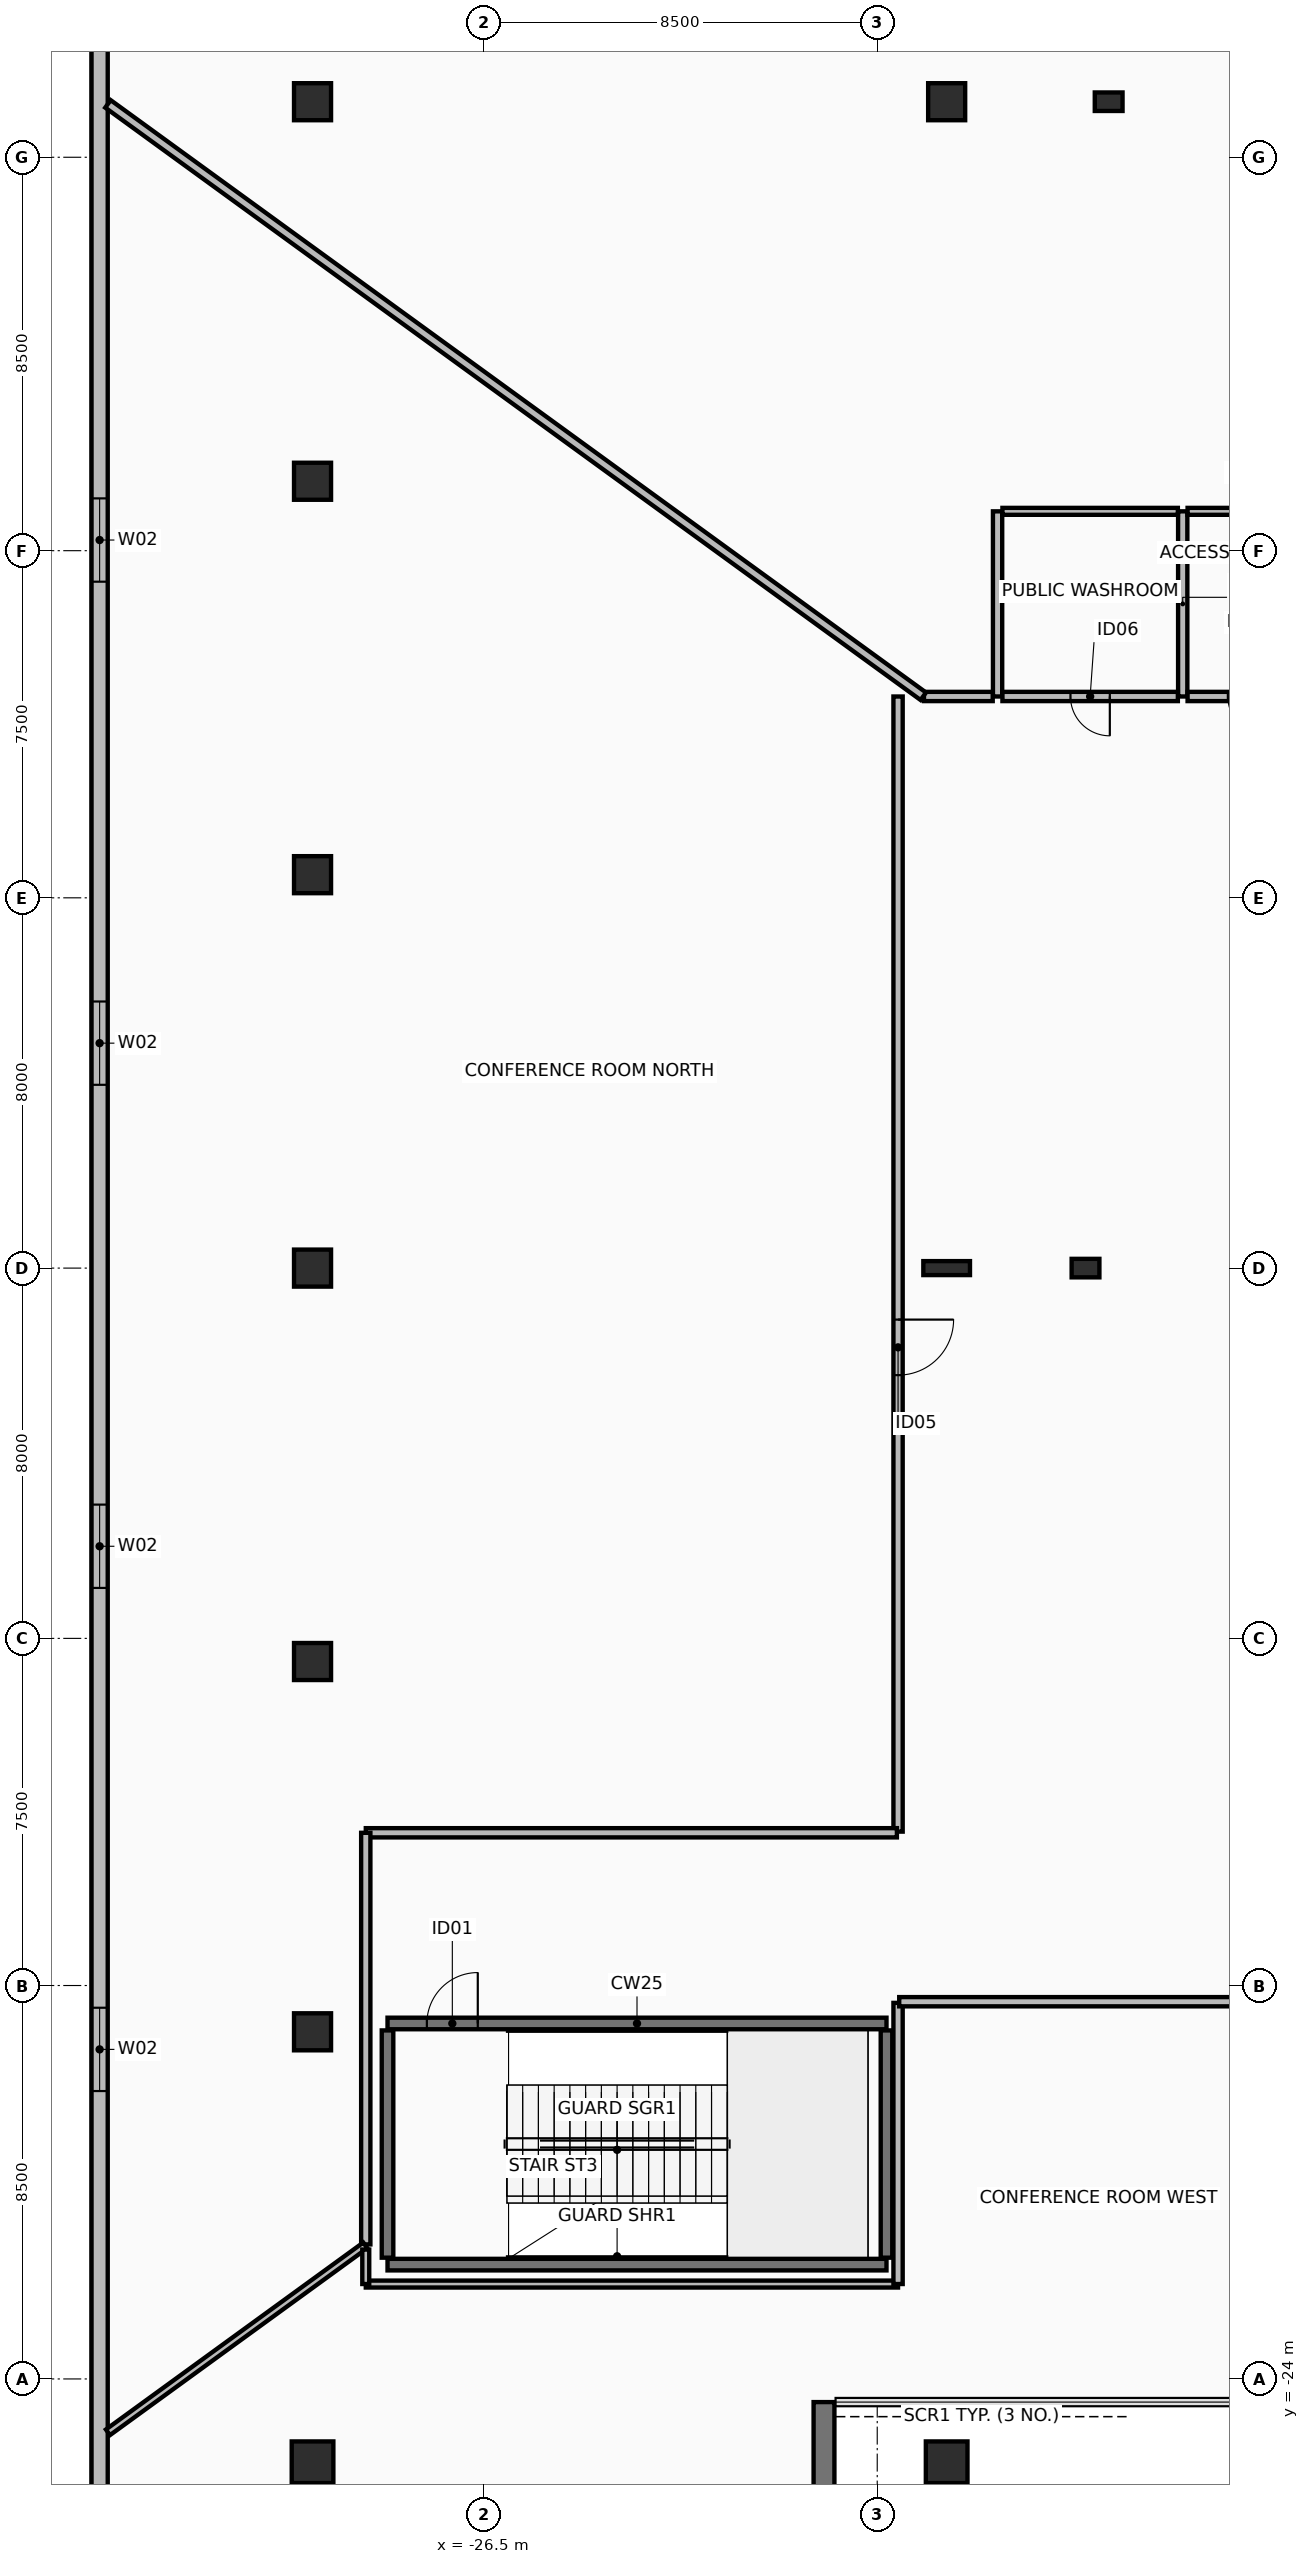
"""IFC4 building model, lengths in metres.
Left out: names, types, materials, properties, quantities, classifications, styles, units other than length and angle.
Written with IfcOpenShell. Run it as: python <this file> out.ifc"""

import sys

from ifc_helpers import new_model, si_unit, direction, frame, frame_2d, origin, origin_2d, place, context, subcontext, project, spatial, rectangle, hollow_rectangle, i_section, extrude, element, fill, save


model = new_model("IFC4")
c1 = context("Model", 3, precision=1e-05, world=origin(), true_north=direction((0.0, 1.0)))
c2 = subcontext(c1, "Body", "Model", "MODEL_VIEW")
j1 = project(units=[si_unit("LENGTHUNIT", "METRE"), si_unit("PLANEANGLEUNIT", "RADIAN")], contexts=[c1])
p1 = place(None, origin())
s1 = spatial("IfcSite", under=j1, at=p1, CompositionType="ELEMENT")
p2 = place(p1, origin())
s2 = spatial("IfcBuilding", under=s1, at=p2, CompositionType="ELEMENT")
p3 = place(p2, frame((0.0, 0.0, 11.0)))
s3 = spatial("IfcBuildingStorey", under=s2, at=p3, CompositionType="ELEMENT", Elevation=11.0)
for number, where, z_axis, x_axis in (
    (1, (-13.5, 0.0, 0.0), (0.0, 0.0, 1.0), (1.0, 0.0, 0.0)),
    (2, (-13.0, 25.2, 0.0), (0.0, 0.0, 1.0), (1.0, 0.0, 0.0)),
):
    element("IfcColumn", number, at=place(p3, frame(where, z_axis=z_axis, x_axis=x_axis)), inside=s3, PredefinedType="PILASTER", context=c2, shape_type="SweptSolid", body=[
        extrude(rectangle(XDim=0.6, YDim=0.4, at=origin_2d()), origin(), (0.0, 0.0, 1.0), 5.5),
    ])
p4 = place(p3, frame((-30.2, -25.8, 0.0), z_axis=(0.0, 0.0, 1.0), x_axis=(1.0, 0.0, 0.0)))
e3 = element("IfcColumn", 3, at=p4, inside=s3, PredefinedType="COLUMN", context=c2, shape_type="SweptSolid", body=[
    extrude(hollow_rectangle(XDim=0.9, YDim=0.9, WallThickness=0.05, at=origin_2d()), origin(), (0.0, 0.0, 1.0), 5.5),
])
p5 = place(p3, frame((-30.2, 25.2, 0.0), z_axis=(0.0, 0.0, 1.0), x_axis=(1.0, 0.0, 0.0)))
e4 = element("IfcColumn", 4, at=p5, inside=s3, PredefinedType="COLUMN", context=c2, shape_type="SweptSolid", body=[
    extrude(hollow_rectangle(XDim=0.8, YDim=0.8, WallThickness=0.045, at=origin_2d()), origin(), (0.0, 0.0, 1.0), 5.5),
])
p6 = place(p3, frame((-16.5, -25.8, 0.0), z_axis=(0.0, 0.0, 1.0), x_axis=(1.0, 0.0, 0.0)))
e5 = element("IfcColumn", 5, at=p6, inside=s3, PredefinedType="COLUMN", context=c2, shape_type="SweptSolid", body=[
    extrude(hollow_rectangle(XDim=0.9, YDim=0.9, WallThickness=0.05, at=origin_2d()), origin(), (0.0, 0.0, 1.0), 5.5),
])
for number, where, z_axis, x_axis in (
    (6, (-16.5, 25.2, 0.0), (0.0, 0.0, 1.0), (1.0, 0.0, 0.0)),
    (7, (-30.2, -16.5, 0.0), (0.0, 0.0, 1.0), (1.0, 0.0, 0.0)),
    (8, (-30.2, -8.5, 0.0), (0.0, 0.0, 1.0), (1.0, 0.0, 0.0)),
    (9, (-30.2, 0.0, 0.0), (0.0, 0.0, 1.0), (1.0, 0.0, 0.0)),
    (10, (-30.2, 8.5, 0.0), (0.0, 0.0, 1.0), (1.0, 0.0, 0.0)),
    (11, (-30.2, 17.0, 0.0), (0.0, 0.0, 1.0), (1.0, 0.0, 0.0)),
):
    element("IfcColumn", number, at=place(p3, frame(where, z_axis=z_axis, x_axis=x_axis)), inside=s3, PredefinedType="COLUMN", context=c2, shape_type="SweptSolid", body=[
        extrude(hollow_rectangle(XDim=0.8, YDim=0.8, WallThickness=0.045, at=origin_2d()), origin(), (0.0, 0.0, 1.0), 5.5),
    ])
p7 = place(p3, frame((-16.5, 0.0, 0.0), z_axis=(0.0, 0.0, 1.0), x_axis=(1.0, 0.0, 0.0)))
e12 = element("IfcColumn", 12, at=p7, inside=s3, PredefinedType="COLUMN", context=c2, shape_type="SweptSolid", body=[
    extrude(i_section(OverallWidth=0.302, OverallDepth=1.008, WebThickness=0.021, FlangeThickness=0.04, at=origin_2d()), origin(), (0.0, 0.0, 1.0), 5.5),
])
p8 = place(p3, frame((-19.15, -27.75, 0.0), z_axis=(0.0, 0.0, 1.0), x_axis=(0.0, 1.0, 0.0)))
e13 = element("IfcWall", 13, at=p8, inside=s3, PredefinedType="STANDARD", context=c2, shape_type="SweptSolid", body=[
    extrude(rectangle(XDim=3.25, YDim=0.45, at=frame_2d((1.625, 0.0))), origin(), (0.0, 0.0, 1.0), 5.24),
])
p9 = place(p3, frame((-34.8, 26.6, 0.0), z_axis=(0.0, 0.0, 1.0), x_axis=(0.0, -1.0, 0.0)))
e14 = element("IfcWall", 14, at=p9, inside=s3, PredefinedType="STANDARD", context=c2, shape_type="SweptSolid", body=[
    extrude(rectangle(XDim=54.35, YDim=0.35, at=frame_2d((27.175, 0.0))), origin(), (0.0, 0.0, 1.0), 5.24),
])
p10 = place(p9, frame((9.97, 0.0, 0.95)))
e15 = element("IfcOpeningElement", 15, at=p10, cuts=e14, PredefinedType="OPENING", context=c2, shape_type="SweptSolid", body=[
    extrude(rectangle(XDim=1.8, YDim=2.2, at=frame_2d((0.9, 1.1))), frame((0.0, 0.185, 0.0), z_axis=(0.0, -1.0, 0.0), x_axis=(1.0, 0.0, 0.0)), (0.0, 0.0, 1.0), 0.37),
])
p11 = place(p9, frame((20.84, 0.0, 0.95)))
e16 = element("IfcOpeningElement", 16, at=p11, cuts=e14, PredefinedType="OPENING", context=c2, shape_type="SweptSolid", body=[
    extrude(rectangle(XDim=1.8, YDim=2.2, at=frame_2d((0.9, 1.1))), frame((0.0, 0.185, 0.0), z_axis=(0.0, -1.0, 0.0), x_axis=(1.0, 0.0, 0.0)), (0.0, 0.0, 1.0), 0.37),
])
p12 = place(p9, frame((31.71, 0.0, 0.95)))
e17 = element("IfcOpeningElement", 17, at=p12, cuts=e14, PredefinedType="OPENING", context=c2, shape_type="SweptSolid", body=[
    extrude(rectangle(XDim=1.8, YDim=2.2, at=frame_2d((0.9, 1.1))), frame((0.0, 0.185, 0.0), z_axis=(0.0, -1.0, 0.0), x_axis=(1.0, 0.0, 0.0)), (0.0, 0.0, 1.0), 0.37),
])
p13 = place(p9, frame((42.58, 0.0, 0.95)))
e18 = element("IfcOpeningElement", 18, at=p13, cuts=e14, PredefinedType="OPENING", context=c2, shape_type="SweptSolid", body=[
    extrude(rectangle(XDim=1.8, YDim=2.2, at=frame_2d((0.9, 1.1))), frame((0.0, 0.185, 0.0), z_axis=(0.0, -1.0, 0.0), x_axis=(1.0, 0.0, 0.0)), (0.0, 0.0, 1.0), 0.37),
])
p14 = place(p3, frame((-28.58, -16.32, 0.0), z_axis=(0.0, 0.0, 1.0), x_axis=(1.0, 0.0, 0.0)))
e19 = element("IfcWall", 19, at=p14, inside=s3, PredefinedType="SHEAR", context=c2, shape_type="SweptSolid", body=[
    extrude(rectangle(XDim=10.78, YDim=0.25, at=frame_2d((5.39, 0.0))), origin(), (0.0, 0.0, 1.0), 5.24),
])
p15 = place(p14, frame((0.85, 0.0, 0.0)))
e20 = element("IfcOpeningElement", 20, at=p15, cuts=e19, PredefinedType="OPENING", context=c2, shape_type="SweptSolid", body=[
    extrude(rectangle(XDim=1.1, YDim=2.15, at=frame_2d((0.55, 1.075))), frame((0.0, 0.135, 0.0), z_axis=(0.0, -1.0, 0.0), x_axis=(1.0, 0.0, 0.0)), (0.0, 0.0, 1.0), 0.27),
])
p16 = place(p3, frame((-28.58, -21.53, 0.0), z_axis=(0.0, 0.0, 1.0), x_axis=(1.0, 0.0, 0.0)))
e21 = element("IfcWall", 21, at=p16, inside=s3, PredefinedType="SHEAR", context=c2, shape_type="SweptSolid", body=[
    extrude(rectangle(XDim=10.78, YDim=0.25, at=frame_2d((5.39, 0.0))), origin(), (0.0, 0.0, 1.0), 5.24),
])
for number, where, z_axis, x_axis in (
    (22, (-28.58, -21.38, 0.0), (0.0, 0.0, 1.0), (0.0, 1.0, 0.0)),
    (23, (-17.8, -21.38, 0.0), (0.0, 0.0, 1.0), (0.0, 1.0, 0.0)),
):
    element("IfcWall", number, at=place(p3, frame(where, z_axis=z_axis, x_axis=x_axis)), inside=s3, PredefinedType="SHEAR", context=c2, shape_type="SweptSolid", body=[
        extrude(rectangle(XDim=4.91, YDim=0.25, at=frame_2d((2.455, 0.0))), origin(), (0.0, 0.0, 1.0), 5.24),
    ])
p17 = place(p3, frame((-11.4, 12.35, 0.0), z_axis=(0.0, 0.0, 1.0), x_axis=(0.0, 1.0, 0.0)))
e24 = element("IfcWall", 24, at=p17, inside=s3, PredefinedType="PARTITIONING", context=c2, shape_type="SweptSolid", body=[
    extrude(rectangle(XDim=4.0, YDim=0.2, at=frame_2d((2.0, 0.0))), origin(), (0.0, 0.0, 1.0), 4.785),
])
p18 = place(p3, frame((-11.295, 16.35, 0.0), z_axis=(0.0, 0.0, 1.0), x_axis=(1.0, 0.0, 0.0)))
e25 = element("IfcWall", 25, at=p18, inside=s3, PredefinedType="PARTITIONING", context=c2, shape_type="SweptSolid", body=[
    extrude(rectangle(XDim=2.695, YDim=0.15, at=frame_2d((1.347, 0.0))), origin(), (0.0, 0.0, 1.0), 3.435),
])
p19 = place(p3, frame((-8.705, 12.35, 0.0), z_axis=(0.0, 0.0, 1.0), x_axis=(-1.0, 0.0, 0.0)))
e26 = element("IfcWall", 26, at=p19, inside=s3, PredefinedType="PARTITIONING", context=c2, shape_type="SweptSolid", body=[
    extrude(rectangle(XDim=2.59, YDim=0.2, at=frame_2d((1.295, 0.0))), origin(), (0.0, 0.0, 1.0), 3.435),
])
p20 = place(p19, frame((0.87, 0.0, 0.0)))
e27 = element("IfcOpeningElement", 27, at=p20, cuts=e26, PredefinedType="OPENING", context=c2, shape_type="SweptSolid", body=[
    extrude(rectangle(XDim=0.85, YDim=2.1, at=frame_2d((0.425, 1.05))), frame((0.0, 0.11, 0.0), z_axis=(0.0, -1.0, 0.0), x_axis=(1.0, 0.0, 0.0)), (0.0, 0.0, 1.0), 0.22),
])
p21 = place(p3, frame((-15.4, 12.35, 0.0), z_axis=(0.0, 0.0, 1.0), x_axis=(0.0, 1.0, 0.0)))
e28 = element("IfcWall", 28, at=p21, inside=s3, PredefinedType="PARTITIONING", context=c2, shape_type="SweptSolid", body=[
    extrude(rectangle(XDim=4.0, YDim=0.2, at=frame_2d((2.0, 0.0))), origin(), (0.0, 0.0, 1.0), 4.785),
])
p22 = place(p3, frame((-15.295, 16.35, 0.0), z_axis=(0.0, 0.0, 1.0), x_axis=(1.0, 0.0, 0.0)))
e29 = element("IfcWall", 29, at=p22, inside=s3, PredefinedType="PARTITIONING", context=c2, shape_type="SweptSolid", body=[
    extrude(rectangle(XDim=3.79, YDim=0.15, at=frame_2d((1.895, 0.0))), origin(), (0.0, 0.0, 1.0), 5.24),
])
p23 = place(p3, frame((-11.505, 12.35, 0.0), z_axis=(0.0, 0.0, 1.0), x_axis=(-1.0, 0.0, 0.0)))
e30 = element("IfcWall", 30, at=p23, inside=s3, PredefinedType="PARTITIONING", context=c2, shape_type="SweptSolid", body=[
    extrude(rectangle(XDim=3.79, YDim=0.2, at=frame_2d((1.895, 0.0))), origin(), (0.0, 0.0, 1.0), 5.24),
])
p24 = place(p23, frame((1.47, 0.0, 0.0)))
e31 = element("IfcOpeningElement", 31, at=p24, cuts=e30, PredefinedType="OPENING", context=c2, shape_type="SweptSolid", body=[
    extrude(rectangle(XDim=0.85, YDim=2.1, at=frame_2d((0.425, 1.05))), frame((0.0, 0.11, 0.0), z_axis=(0.0, -1.0, 0.0), x_axis=(1.0, 0.0, 0.0)), (0.0, 0.0, 1.0), 0.22),
])
p25 = place(p3, frame((-15.505, 12.35, 0.0), z_axis=(0.0, 0.0, 1.0), x_axis=(-1.0, 0.0, 0.0)))
e32 = element("IfcWall", 32, at=p25, inside=s3, PredefinedType="PARTITIONING", context=c2, shape_type="SweptSolid", body=[
    extrude(rectangle(XDim=1.485, YDim=0.2, at=frame_2d((0.743, 0.0))), origin(), (0.0, 0.0, 1.0), 3.435),
])
p26 = place(p3, frame((-17.005, 12.355, 0.0), z_axis=(0.0, 0.0, 1.0), x_axis=(-0.809019641583, 0.587781608707, 0.0)))
e33 = element("IfcWall", 33, at=p26, inside=s3, PredefinedType="PARTITIONING", context=c2, shape_type="SweptSolid", body=[
    extrude(rectangle(XDim=21.773, YDim=0.2, at=frame_2d((10.887, 0.0))), origin(), (0.0, 0.0, 1.0), 4.435),
])
p27 = place(p3, frame((-17.55, 12.349, 0.0), z_axis=(0.0, 0.0, 1.0), x_axis=(0.0, -1.0, 0.0)))
e34 = element("IfcWall", 34, at=p27, inside=s3, PredefinedType="PARTITIONING", context=c2, shape_type="SweptSolid", body=[
    extrude(rectangle(XDim=24.524, YDim=0.2, at=frame_2d((12.262, 0.0))), origin(), (0.0, 0.0, 1.0), 3.435),
])
p28 = place(p27, frame((13.462, 0.0, 0.0)))
e35 = element("IfcOpeningElement", 35, at=p28, cuts=e34, PredefinedType="OPENING", context=c2, shape_type="SweptSolid", body=[
    extrude(rectangle(XDim=1.2, YDim=2.15, at=frame_2d((0.6, 1.075))), frame((0.0, 0.11, 0.0), z_axis=(0.0, -1.0, 0.0), x_axis=(1.0, 0.0, 0.0)), (0.0, 0.0, 1.0), 0.22),
])
p29 = place(p3, frame((-17.575, -12.2, 0.0), z_axis=(0.0, 0.0, 1.0), x_axis=(-1.0, 0.0, 0.0)))
e36 = element("IfcWall", 36, at=p29, inside=s3, PredefinedType="PARTITIONING", context=c2, shape_type="SweptSolid", body=[
    extrude(rectangle(XDim=11.474, YDim=0.2, at=frame_2d((5.737, 0.0))), origin(), (0.0, 0.0, 1.0), 5.24),
])
p30 = place(p3, frame((-29.05, -12.201, 0.0), z_axis=(0.0, 0.0, 1.0), x_axis=(0.0, -1.0, 0.0)))
e37 = element("IfcWall", 37, at=p30, inside=s3, PredefinedType="PARTITIONING", context=c2, shape_type="SweptSolid", body=[
    extrude(rectangle(XDim=8.893, YDim=0.2, at=frame_2d((4.446, 0.0))), origin(), (0.0, 0.0, 1.0), 4.785),
])
p31 = place(p3, frame((-29.06, -21.114, 0.0), z_axis=(0.0, 0.0, 1.0), x_axis=(-0.809026336195, -0.587772394166, 0.0)))
e38 = element("IfcWall", 38, at=p31, inside=s3, PredefinedType="PARTITIONING", context=c2, shape_type="SweptSolid", body=[
    extrude(rectangle(XDim=6.872, YDim=0.15, at=frame_2d((3.436, 0.0))), origin(), (0.0, 0.0, 1.0), 4.435),
])
p32 = place(p3, frame((-29.049, -21.95, 0.0), z_axis=(0.0, 0.0, 1.0), x_axis=(1.0, 0.0, 0.0)))
e39 = element("IfcWall", 39, at=p32, inside=s3, PredefinedType="PARTITIONING", context=c2, shape_type="SweptSolid", body=[
    extrude(rectangle(XDim=11.499, YDim=0.15, at=frame_2d((5.75, 0.0))), origin(), (0.0, 0.0, 1.0), 5.24),
])
p33 = place(p3, frame((-17.55, -21.949, 0.0), z_axis=(0.0, 0.0, 1.0), x_axis=(0.0, 1.0, 0.0)))
e40 = element("IfcWall", 40, at=p33, inside=s3, PredefinedType="PARTITIONING", context=c2, shape_type="SweptSolid", body=[
    extrude(rectangle(XDim=6.074, YDim=0.2, at=frame_2d((3.037, 0.0))), origin(), (0.0, 0.0, 1.0), 5.24),
])
p34 = place(p3, frame((-17.525, -15.85, 0.0), z_axis=(0.0, 0.0, 1.0), x_axis=(1.0, 0.0, 0.0)))
e41 = element("IfcWall", 41, at=p34, inside=s3, PredefinedType="PARTITIONING", context=c2, shape_type="SweptSolid", body=[
    extrude(rectangle(XDim=21.581, YDim=0.2, at=frame_2d((10.791, 0.0))), origin(), (0.0, 0.0, 1.0), 2.935),
])
p35 = place(p34, frame((10.191, 0.0, 0.0)))
e42 = element("IfcOpeningElement", 42, at=p35, cuts=e41, PredefinedType="OPENING", context=c2, shape_type="SweptSolid", body=[
    extrude(rectangle(XDim=1.2, YDim=2.15, at=frame_2d((0.6, 1.075))), frame((0.0, 0.11, 0.0), z_axis=(0.0, -1.0, 0.0), x_axis=(1.0, 0.0, 0.0)), (0.0, 0.0, 1.0), 0.22),
])
p36 = place(p3, frame((-29.05, -21.205, 0.0), z_axis=(0.0, 0.0, 1.0), x_axis=(0.0, -1.0, 0.0)))
e43 = element("IfcWall", 43, at=p36, inside=s3, PredefinedType="PARTITIONING", context=c2, shape_type="SweptSolid", body=[
    extrude(rectangle(XDim=0.745, YDim=0.15, at=frame_2d((0.372, 0.0))), origin(), (0.0, 0.0, 1.0), 5.24),
])
p37 = place(p10, origin())
e44 = element("IfcWindow", 44, at=p37, inside=s3, PartitioningType="SINGLE_PANEL", PredefinedType="WINDOW", context=c2, shape_type="SweptSolid", body=[
    extrude(rectangle(XDim=1.8, YDim=2.2, at=frame_2d((0.9, 1.1))), frame((0.0, 0.03, 0.0), z_axis=(0.0, -1.0, 0.0), x_axis=(1.0, 0.0, 0.0)), (0.0, 0.0, 1.0), 0.06),
])
fill(e15, e44)
p38 = place(p11, origin())
e45 = element("IfcWindow", 45, at=p38, inside=s3, PartitioningType="SINGLE_PANEL", PredefinedType="WINDOW", context=c2, shape_type="SweptSolid", body=[
    extrude(rectangle(XDim=1.8, YDim=2.2, at=frame_2d((0.9, 1.1))), frame((0.0, 0.03, 0.0), z_axis=(0.0, -1.0, 0.0), x_axis=(1.0, 0.0, 0.0)), (0.0, 0.0, 1.0), 0.06),
])
fill(e16, e45)
p39 = place(p12, origin())
e46 = element("IfcWindow", 46, at=p39, inside=s3, PartitioningType="SINGLE_PANEL", PredefinedType="WINDOW", context=c2, shape_type="SweptSolid", body=[
    extrude(rectangle(XDim=1.8, YDim=2.2, at=frame_2d((0.9, 1.1))), frame((0.0, 0.03, 0.0), z_axis=(0.0, -1.0, 0.0), x_axis=(1.0, 0.0, 0.0)), (0.0, 0.0, 1.0), 0.06),
])
fill(e17, e46)
p40 = place(p13, origin())
e47 = element("IfcWindow", 47, at=p40, inside=s3, PartitioningType="SINGLE_PANEL", PredefinedType="WINDOW", context=c2, shape_type="SweptSolid", body=[
    extrude(rectangle(XDim=1.8, YDim=2.2, at=frame_2d((0.9, 1.1))), frame((0.0, 0.03, 0.0), z_axis=(0.0, -1.0, 0.0), x_axis=(1.0, 0.0, 0.0)), (0.0, 0.0, 1.0), 0.06),
])
fill(e18, e47)
p41 = place(p15, frame((1.1, 0.0, 0.0), z_axis=(0.0, 0.0, 1.0), x_axis=(-1.0, 0.0, 0.0)))
e48 = element("IfcDoor", 48, at=p41, inside=s3, OperationType="SINGLE_SWING_LEFT", PredefinedType="DOOR", context=c2, shape_type="SweptSolid", body=[
    extrude(rectangle(XDim=1.1, YDim=2.15, at=frame_2d((0.55, 1.075))), frame((0.0, 0.025, 0.0), z_axis=(0.0, -1.0, 0.0), x_axis=(1.0, 0.0, 0.0)), (0.0, 0.0, 1.0), 0.05),
])
fill(e20, e48)
p42 = place(p20, origin())
e49 = element("IfcDoor", 49, at=p42, inside=s3, OperationType="SINGLE_SWING_RIGHT", PredefinedType="DOOR", context=c2, shape_type="SweptSolid", body=[
    extrude(rectangle(XDim=0.85, YDim=2.1, at=frame_2d((0.425, 1.05))), frame((0.0, 0.025, 0.0), z_axis=(0.0, -1.0, 0.0), x_axis=(1.0, 0.0, 0.0)), (0.0, 0.0, 1.0), 0.05),
])
fill(e27, e49)
p43 = place(p24, origin())
e50 = element("IfcDoor", 50, at=p43, inside=s3, OperationType="SINGLE_SWING_RIGHT", PredefinedType="DOOR", context=c2, shape_type="SweptSolid", body=[
    extrude(rectangle(XDim=0.85, YDim=2.1, at=frame_2d((0.425, 1.05))), frame((0.0, 0.025, 0.0), z_axis=(0.0, -1.0, 0.0), x_axis=(1.0, 0.0, 0.0)), (0.0, 0.0, 1.0), 0.05),
])
fill(e31, e50)
p44 = place(p28, origin())
e51 = element("IfcDoor", 51, at=p44, inside=s3, OperationType="SINGLE_SWING_LEFT", PredefinedType="DOOR", context=c2, shape_type="SweptSolid", body=[
    extrude(rectangle(XDim=1.2, YDim=2.15, at=frame_2d((0.6, 1.075))), frame((0.0, 0.025, 0.0), z_axis=(0.0, -1.0, 0.0), x_axis=(1.0, 0.0, 0.0)), (0.0, 0.0, 1.0), 0.05),
])
fill(e35, e51)
save(model, sys.argv[1])
